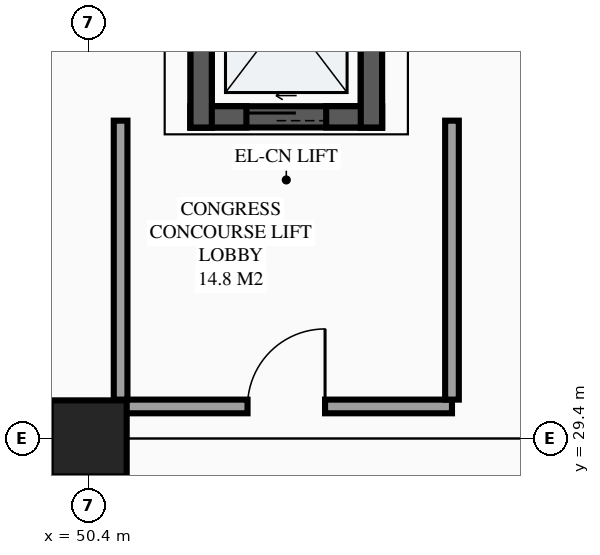
"""IFC4 building model, lengths in metres.
Left out: names, types, materials, properties, quantities, classifications, styles, units other than length and angle.
Written with IfcOpenShell. Run it as: python <this file> out.ifc"""

import sys

from ifc_helpers import new_model, si_unit, direction, frame, frame_2d, origin, origin_2d, place, context, subcontext, project, spatial, rectangle, extrude, element, fill, save


model = new_model("IFC4")
c1 = context("Model", 3, precision=1e-05, world=origin(), true_north=direction((0.0, 1.0)))
c2 = subcontext(c1, "Body", "Model", "MODEL_VIEW")
j1 = project(units=[si_unit("LENGTHUNIT", "METRE"), si_unit("PLANEANGLEUNIT", "RADIAN")], contexts=[c1])
p1 = place(None, origin())
s1 = spatial("IfcSite", under=j1, at=p1, CompositionType="ELEMENT")
p2 = place(p1, origin())
s2 = spatial("IfcBuilding", under=s1, at=p2, CompositionType="ELEMENT")
p3 = place(p2, frame((0.0, 0.0, -4.5)))
s3 = spatial("IfcBuildingStorey", under=s2, at=p3, CompositionType="ELEMENT", Elevation=-4.5)
p4 = place(p3, frame((50.4, 29.4, -0.36), z_axis=(0.0, 0.0, 1.0), x_axis=(1.0, 0.0, 0.0)))
e1 = element("IfcColumn", 1, at=p4, inside=s3, PredefinedType="COLUMN", context=c2, shape_type="SweptSolid", body=[
    extrude(rectangle(XDim=1.0, YDim=1.0, at=origin_2d()), origin(), (0.0, 0.0, 1.0), 4.86),
])
p5 = place(p3, frame((51.74, 33.63, -1.5), z_axis=(0.0, 0.0, 1.0), x_axis=(1.0, 0.0, 0.0)))
e2 = element("IfcWall", 2, at=p5, inside=s3, PredefinedType="SHEAR", context=c2, shape_type="SweptSolid", body=[
    extrude(rectangle(XDim=2.52, YDim=0.28, at=frame_2d((1.26, 0.0))), origin(), (0.0, 0.0, 1.0), 1.5),
])
for number, where, z_axis, x_axis in (
    (3, (54.12, 33.49, -1.5), (0.0, 0.0, 1.0), (0.0, 1.0, 0.0)),
    (4, (51.88, 36.51, -1.5), (0.0, 0.0, 1.0), (0.0, -1.0, 0.0)),
):
    element("IfcWall", number, at=place(p3, frame(where, z_axis=z_axis, x_axis=x_axis)), inside=s3, PredefinedType="SHEAR", context=c2, shape_type="SweptSolid", body=[
        extrude(rectangle(XDim=3.02, YDim=0.28, at=frame_2d((1.51, 0.0))), origin(), (0.0, 0.0, 1.0), 1.5),
    ])
p6 = place(p3, frame((51.74, 33.63, 0.0), z_axis=(0.0, 0.0, 1.0), x_axis=(1.0, 0.0, 0.0)))
e5 = element("IfcWall", 5, at=p6, inside=s3, PredefinedType="SHEAR", context=c2, shape_type="SweptSolid", body=[
    extrude(rectangle(XDim=2.52, YDim=0.28, at=frame_2d((1.26, 0.0))), origin(), (0.0, 0.0, 1.0), 4.5),
])
p7 = place(p6, frame((0.735, 0.0, 0.0)))
e6 = element("IfcOpeningElement", 6, at=p7, cuts=e5, PredefinedType="OPENING", context=c2, shape_type="SweptSolid", body=[
    extrude(rectangle(XDim=1.05, YDim=2.2, at=frame_2d((0.525, 1.1))), frame((0.0, 0.15, 0.0), z_axis=(0.0, -1.0, 0.0), x_axis=(1.0, 0.0, 0.0)), (0.0, 0.0, 1.0), 0.3),
])
for number, where, z_axis, x_axis in (
    (7, (54.12, 33.49, 0.0), (0.0, 0.0, 1.0), (0.0, 1.0, 0.0)),
    (8, (51.88, 36.51, 0.0), (0.0, 0.0, 1.0), (0.0, -1.0, 0.0)),
):
    element("IfcWall", number, at=place(p3, frame(where, z_axis=z_axis, x_axis=x_axis)), inside=s3, PredefinedType="SHEAR", context=c2, shape_type="SweptSolid", body=[
        extrude(rectangle(XDim=3.02, YDim=0.28, at=frame_2d((1.51, 0.0))), origin(), (0.0, 0.0, 1.0), 4.5),
    ])
p8 = place(p3, frame((50.82, 29.82, 0.0), z_axis=(0.0, 0.0, 1.0), x_axis=(1.0, 0.0, 0.0)))
e9 = element("IfcWall", 9, at=p8, inside=s3, PredefinedType="PARTITIONING", context=c2, shape_type="SweptSolid", body=[
    extrude(rectangle(XDim=4.36, YDim=0.18, at=frame_2d((2.18, 0.0))), origin(), (0.0, 0.0, 1.0), 4.175),
])
p9 = place(p8, frame((1.67, 0.0, 0.0)))
e10 = element("IfcOpeningElement", 10, at=p9, cuts=e9, PredefinedType="OPENING", context=c2, shape_type="SweptSolid", body=[
    extrude(rectangle(XDim=1.02, YDim=2.15, at=frame_2d((0.51, 1.075))), frame((0.0, 0.1, 0.0), z_axis=(0.0, -1.0, 0.0), x_axis=(1.0, 0.0, 0.0)), (0.0, 0.0, 1.0), 0.2),
])
for number, where, z_axis, x_axis in (
    (11, (50.82, 29.91, 0.0), (0.0, 0.0, 1.0), (0.0, 1.0, 0.0)),
    (12, (55.18, 29.91, 0.0), (0.0, 0.0, 1.0), (0.0, 1.0, 0.0)),
):
    element("IfcWall", number, at=place(p3, frame(where, z_axis=z_axis, x_axis=x_axis)), inside=s3, PredefinedType="PARTITIONING", context=c2, shape_type="SweptSolid", body=[
        extrude(rectangle(XDim=3.67, YDim=0.18, at=frame_2d((1.835, 0.0))), origin(), (0.0, 0.0, 1.0), 4.175),
    ])
p10 = place(p7, origin())
e13 = element("IfcDoor", 13, at=p10, inside=s3, OperationType="SLIDING_TO_LEFT", PredefinedType="DOOR", context=c2, shape_type="SweptSolid", body=[
    extrude(rectangle(XDim=1.05, YDim=2.2, at=frame_2d((0.525, 1.1))), frame((0.0, 0.025, 0.0), z_axis=(0.0, -1.0, 0.0), x_axis=(1.0, 0.0, 0.0)), (0.0, 0.0, 1.0), 0.05),
])
fill(e6, e13)
p11 = place(p9, origin())
e14 = element("IfcDoor", 14, at=p11, inside=s3, OperationType="SINGLE_SWING_RIGHT", PredefinedType="DOOR", context=c2, shape_type="SweptSolid", body=[
    extrude(rectangle(XDim=1.02, YDim=2.15, at=frame_2d((0.51, 1.075))), frame((0.0, 0.025, 0.0), z_axis=(0.0, -1.0, 0.0), x_axis=(1.0, 0.0, 0.0)), (0.0, 0.0, 1.0), 0.05),
])
fill(e10, e14)
save(model, sys.argv[1])
